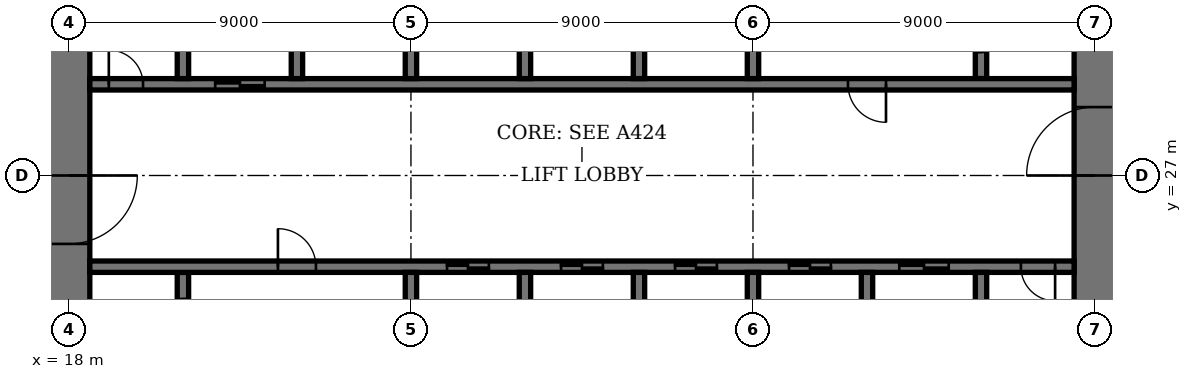
"""IFC4 building model, lengths in metres.
Left out: names, types, materials, properties, quantities, classifications, styles, units other than length and angle.
Written with IfcOpenShell. Run it as: python <this file> out.ifc"""

import sys

from ifc_helpers import new_model, si_unit, direction, frame, frame_2d, origin, place, context, subcontext, project, spatial, rectangle, extrude, element, fill, save


model = new_model("IFC4")
c1 = context("Model", 3, precision=1e-05, world=origin(), true_north=direction((0.0, 1.0)))
c2 = subcontext(c1, "Body", "Model", "MODEL_VIEW")
j1 = project(units=[si_unit("LENGTHUNIT", "METRE"), si_unit("PLANEANGLEUNIT", "RADIAN")], contexts=[c1])
p1 = place(None, origin())
s1 = spatial("IfcSite", under=j1, at=p1, CompositionType="ELEMENT")
p2 = place(p1, origin())
s2 = spatial("IfcBuilding", under=s1, at=p2, CompositionType="ELEMENT")
p3 = place(p2, frame((0.0, 0.0, 10.8)))
s3 = spatial("IfcBuildingStorey", under=s2, at=p3, CompositionType="ELEMENT", Elevation=10.8)
p4 = place(p3, frame((18.0, 35.45, 0.0), z_axis=(0.0, 0.0, 1.0), x_axis=(0.0, -1.0, 0.0)))
e1 = element("IfcWall", 1, at=p4, inside=s3, PredefinedType="SHEAR", context=c2, shape_type="SweptSolid", body=[
    extrude(rectangle(XDim=16.9, YDim=1.1, at=frame_2d((8.45, 0.0))), origin(), (0.0, 0.0, 1.0), 5.0),
])
p5 = place(p4, frame((8.45, 0.0, 0.0)))
e2 = element("IfcOpeningElement", 2, at=p5, cuts=e1, PredefinedType="OPENING", context=c2, shape_type="SweptSolid", body=[
    extrude(rectangle(XDim=1.8, YDim=2.4, at=frame_2d((0.9, 1.2))), frame((0.0, 0.56, 0.0), z_axis=(0.0, -1.0, 0.0), x_axis=(1.0, 0.0, 0.0)), (0.0, 0.0, 1.0), 1.12),
])
p6 = place(p3, frame((45.0, 18.55, 0.0), z_axis=(0.0, 0.0, 1.0), x_axis=(0.0, 1.0, 0.0)))
e3 = element("IfcWall", 3, at=p6, inside=s3, PredefinedType="SHEAR", context=c2, shape_type="SweptSolid", body=[
    extrude(rectangle(XDim=16.9, YDim=1.1, at=frame_2d((8.45, 0.0))), origin(), (0.0, 0.0, 1.0), 5.0),
])
p7 = place(p6, frame((8.45, 0.0, 0.0)))
e4 = element("IfcOpeningElement", 4, at=p7, cuts=e3, PredefinedType="OPENING", context=c2, shape_type="SweptSolid", body=[
    extrude(rectangle(XDim=1.8, YDim=2.4, at=frame_2d((0.9, 1.2))), frame((0.0, 0.56, 0.0), z_axis=(0.0, -1.0, 0.0), x_axis=(1.0, 0.0, 0.0)), (0.0, 0.0, 1.0), 1.12),
])
p8 = place(p3, frame((21.0, 21.95, 0.0), z_axis=(0.0, 0.0, 1.0), x_axis=(0.0, 1.0, 0.0)))
e5 = element("IfcWall", 5, at=p8, inside=s3, PredefinedType="SHEAR", context=c2, shape_type="SweptSolid", body=[
    extrude(rectangle(XDim=2.5, YDim=0.3, at=frame_2d((1.25, 0.0))), origin(), (0.0, 0.0, 1.0), 5.0),
])
p9 = place(p8, frame((0.7, 0.0, 0.0)))
e6 = element("IfcOpeningElement", 6, at=p9, cuts=e5, PredefinedType="OPENING", context=c2, shape_type="SweptSolid", body=[
    extrude(rectangle(XDim=1.1, YDim=2.4, at=frame_2d((0.55, 1.2))), frame((0.0, 0.16, 0.0), z_axis=(0.0, -1.0, 0.0), x_axis=(1.0, 0.0, 0.0)), (0.0, 0.0, 1.0), 0.32),
])
p10 = place(p3, frame((42.0, 29.55, 0.0), z_axis=(0.0, 0.0, 1.0), x_axis=(0.0, 1.0, 0.0)))
e7 = element("IfcWall", 7, at=p10, inside=s3, PredefinedType="SHEAR", context=c2, shape_type="SweptSolid", body=[
    extrude(rectangle(XDim=2.5, YDim=0.3, at=frame_2d((1.25, 0.0))), origin(), (0.0, 0.0, 1.0), 5.0),
])
p11 = place(p10, frame((0.7, 0.0, 0.0)))
e8 = element("IfcOpeningElement", 8, at=p11, cuts=e7, PredefinedType="OPENING", context=c2, shape_type="SweptSolid", body=[
    extrude(rectangle(XDim=1.1, YDim=2.4, at=frame_2d((0.55, 1.2))), frame((0.0, 0.16, 0.0), z_axis=(0.0, -1.0, 0.0), x_axis=(1.0, 0.0, 0.0)), (0.0, 0.0, 1.0), 0.32),
])
p12 = place(p3, frame((18.55, 24.6, 0.0), z_axis=(0.0, 0.0, 1.0), x_axis=(1.0, 0.0, 0.0)))
e9 = element("IfcWall", 9, at=p12, inside=s3, PredefinedType="SHEAR", context=c2, shape_type="SweptSolid", body=[
    extrude(rectangle(XDim=25.9, YDim=0.3, at=frame_2d((12.95, 0.0))), origin(), (0.0, 0.0, 1.0), 5.0),
])
p13 = place(p12, frame((4.95, 0.0, 0.0)))
e10 = element("IfcOpeningElement", 10, at=p13, cuts=e9, PredefinedType="OPENING", context=c2, shape_type="SweptSolid", body=[
    extrude(rectangle(XDim=1.0, YDim=2.4, at=frame_2d((0.5, 1.2))), frame((0.0, 0.16, 0.0), z_axis=(0.0, -1.0, 0.0), x_axis=(1.0, 0.0, 0.0)), (0.0, 0.0, 1.0), 0.32),
])
p14 = place(p12, frame((24.5, 0.0, 0.0)))
e11 = element("IfcOpeningElement", 11, at=p14, cuts=e9, PredefinedType="OPENING", context=c2, shape_type="SweptSolid", body=[
    extrude(rectangle(XDim=0.9, YDim=2.1, at=frame_2d((0.45, 1.05))), frame((0.0, 0.16, 0.0), z_axis=(0.0, -1.0, 0.0), x_axis=(1.0, 0.0, 0.0)), (0.0, 0.0, 1.0), 0.32),
])
p15 = place(p12, frame((9.4, 0.0, 0.0)))
e12 = element("IfcOpeningElement", 12, at=p15, cuts=e9, PredefinedType="OPENING", context=c2, shape_type="SweptSolid", body=[
    extrude(rectangle(XDim=1.1, YDim=2.4, at=frame_2d((0.55, 1.2))), frame((0.0, 0.16, 0.0), z_axis=(0.0, -1.0, 0.0), x_axis=(1.0, 0.0, 0.0)), (0.0, 0.0, 1.0), 0.32),
])
p16 = place(p12, frame((12.4, 0.0, 0.0)))
e13 = element("IfcOpeningElement", 13, at=p16, cuts=e9, PredefinedType="OPENING", context=c2, shape_type="SweptSolid", body=[
    extrude(rectangle(XDim=1.1, YDim=2.4, at=frame_2d((0.55, 1.2))), frame((0.0, 0.16, 0.0), z_axis=(0.0, -1.0, 0.0), x_axis=(1.0, 0.0, 0.0)), (0.0, 0.0, 1.0), 0.32),
])
p17 = place(p12, frame((15.4, 0.0, 0.0)))
e14 = element("IfcOpeningElement", 14, at=p17, cuts=e9, PredefinedType="OPENING", context=c2, shape_type="SweptSolid", body=[
    extrude(rectangle(XDim=1.1, YDim=2.4, at=frame_2d((0.55, 1.2))), frame((0.0, 0.16, 0.0), z_axis=(0.0, -1.0, 0.0), x_axis=(1.0, 0.0, 0.0)), (0.0, 0.0, 1.0), 0.32),
])
p18 = place(p12, frame((18.4, 0.0, 0.0)))
e15 = element("IfcOpeningElement", 15, at=p18, cuts=e9, PredefinedType="OPENING", context=c2, shape_type="SweptSolid", body=[
    extrude(rectangle(XDim=1.1, YDim=2.4, at=frame_2d((0.55, 1.2))), frame((0.0, 0.16, 0.0), z_axis=(0.0, -1.0, 0.0), x_axis=(1.0, 0.0, 0.0)), (0.0, 0.0, 1.0), 0.32),
])
p19 = place(p12, frame((21.3, 0.0, 0.0)))
e16 = element("IfcOpeningElement", 16, at=p19, cuts=e9, PredefinedType="OPENING", context=c2, shape_type="SweptSolid", body=[
    extrude(rectangle(XDim=1.3, YDim=2.4, at=frame_2d((0.65, 1.2))), frame((0.0, 0.16, 0.0), z_axis=(0.0, -1.0, 0.0), x_axis=(1.0, 0.0, 0.0)), (0.0, 0.0, 1.0), 0.32),
])
p20 = place(p3, frame((18.55, 29.4, 0.0), z_axis=(0.0, 0.0, 1.0), x_axis=(1.0, 0.0, 0.0)))
e17 = element("IfcWall", 17, at=p20, inside=s3, PredefinedType="SHEAR", context=c2, shape_type="SweptSolid", body=[
    extrude(rectangle(XDim=25.9, YDim=0.3, at=frame_2d((12.95, 0.0))), origin(), (0.0, 0.0, 1.0), 5.0),
])
p21 = place(p20, frame((19.95, 0.0, 0.0)))
e18 = element("IfcOpeningElement", 18, at=p21, cuts=e17, PredefinedType="OPENING", context=c2, shape_type="SweptSolid", body=[
    extrude(rectangle(XDim=1.0, YDim=2.4, at=frame_2d((0.5, 1.2))), frame((0.0, 0.16, 0.0), z_axis=(0.0, -1.0, 0.0), x_axis=(1.0, 0.0, 0.0)), (0.0, 0.0, 1.0), 0.32),
])
p22 = place(p20, frame((0.5, 0.0, 0.0)))
e19 = element("IfcOpeningElement", 19, at=p22, cuts=e17, PredefinedType="OPENING", context=c2, shape_type="SweptSolid", body=[
    extrude(rectangle(XDim=0.9, YDim=2.1, at=frame_2d((0.45, 1.05))), frame((0.0, 0.16, 0.0), z_axis=(0.0, -1.0, 0.0), x_axis=(1.0, 0.0, 0.0)), (0.0, 0.0, 1.0), 0.32),
])
p23 = place(p20, frame((3.3, 0.0, 0.0)))
e20 = element("IfcOpeningElement", 20, at=p23, cuts=e17, PredefinedType="OPENING", context=c2, shape_type="SweptSolid", body=[
    extrude(rectangle(XDim=1.3, YDim=2.4, at=frame_2d((0.65, 1.2))), frame((0.0, 0.16, 0.0), z_axis=(0.0, -1.0, 0.0), x_axis=(1.0, 0.0, 0.0)), (0.0, 0.0, 1.0), 0.32),
])
for number, where, z_axis, x_axis in (
    (21, (30.0, 21.75, 0.0), (0.0, 0.0, 1.0), (0.0, 1.0, 0.0)),
    (22, (33.0, 29.55, 0.0), (0.0, 0.0, 1.0), (0.0, 1.0, 0.0)),
    (23, (33.0, 21.75, 0.0), (0.0, 0.0, 1.0), (0.0, 1.0, 0.0)),
    (24, (30.0, 29.55, 0.0), (0.0, 0.0, 1.0), (0.0, 1.0, 0.0)),
    (25, (36.0, 21.75, 0.0), (0.0, 0.0, 1.0), (0.0, 1.0, 0.0)),
    (26, (27.0, 29.55, 0.0), (0.0, 0.0, 1.0), (0.0, 1.0, 0.0)),
):
    element("IfcWall", number, at=place(p3, frame(where, z_axis=z_axis, x_axis=x_axis)), inside=s3, PredefinedType="SHEAR", context=c2, shape_type="SweptSolid", body=[
        extrude(rectangle(XDim=2.7, YDim=0.3, at=frame_2d((1.35, 0.0))), origin(), (0.0, 0.0, 1.0), 5.0),
    ])
for number, where, z_axis, x_axis in (
    (27, (39.0, 18.55, 0.0), (0.0, 0.0, 1.0), (0.0, 1.0, 0.0)),
    (28, (24.0, 29.55, 0.0), (0.0, 0.0, 1.0), (0.0, 1.0, 0.0)),
):
    element("IfcWall", number, at=place(p3, frame(where, z_axis=z_axis, x_axis=x_axis)), inside=s3, PredefinedType="SHEAR", context=c2, shape_type="SweptSolid", body=[
        extrude(rectangle(XDim=5.9, YDim=0.3, at=frame_2d((2.95, 0.0))), origin(), (0.0, 0.0, 1.0), 5.0),
    ])
for number, where, z_axis, x_axis in (
    (29, (42.0, 21.75, 0.0), (0.0, 0.0, 1.0), (0.0, 1.0, 0.0)),
    (30, (21.0, 29.55, 0.0), (0.0, 0.0, 1.0), (0.0, 1.0, 0.0)),
):
    element("IfcWall", number, at=place(p3, frame(where, z_axis=z_axis, x_axis=x_axis)), inside=s3, PredefinedType="SHEAR", context=c2, shape_type="SweptSolid", body=[
        extrude(rectangle(XDim=2.7, YDim=0.3, at=frame_2d((1.35, 0.0))), origin(), (0.0, 0.0, 1.0), 5.0),
    ])
for number, where, z_axis, x_axis in (
    (31, (27.0, 21.6, 0.0), (0.0, 0.0, 1.0), (0.0, 1.0, 0.0)),
    (32, (36.0, 29.55, 0.0), (0.0, 0.0, 1.0), (0.0, 1.0, 0.0)),
):
    element("IfcWall", number, at=place(p3, frame(where, z_axis=z_axis, x_axis=x_axis)), inside=s3, PredefinedType="SHEAR", context=c2, shape_type="SweptSolid", body=[
        extrude(rectangle(XDim=2.85, YDim=0.3, at=frame_2d((1.425, 0.0))), origin(), (0.0, 0.0, 1.0), 5.0),
    ])
p24 = place(p5, origin())
e33 = element("IfcDoor", 33, at=p24, inside=s3, OperationType="DOUBLE_DOOR_DOUBLE_SWING", PredefinedType="DOOR", context=c2, shape_type="SweptSolid", body=[
    extrude(rectangle(XDim=1.8, YDim=2.4, at=frame_2d((0.9, 1.2))), frame((0.0, 0.03, 0.0), z_axis=(0.0, -1.0, 0.0), x_axis=(1.0, 0.0, 0.0)), (0.0, 0.0, 1.0), 0.06),
    extrude(rectangle(XDim=0.04, YDim=2.4, at=frame_2d((0.02, 1.2))), frame((0.0, 0.55, 0.0), z_axis=(0.0, -1.0, 0.0), x_axis=(1.0, 0.0, 0.0)), (0.0, 0.0, 1.0), 1.1),
    extrude(rectangle(XDim=0.04, YDim=2.4, at=frame_2d((1.78, 1.2))), frame((0.0, 0.55, 0.0), z_axis=(0.0, -1.0, 0.0), x_axis=(1.0, 0.0, 0.0)), (0.0, 0.0, 1.0), 1.1),
    extrude(rectangle(XDim=1.8, YDim=0.04, at=frame_2d((0.9, 2.38))), frame((0.0, 0.55, 0.0), z_axis=(0.0, -1.0, 0.0), x_axis=(1.0, 0.0, 0.0)), (0.0, 0.0, 1.0), 1.1),
])
fill(e2, e33)
p25 = place(p7, origin())
e34 = element("IfcDoor", 34, at=p25, inside=s3, OperationType="DOUBLE_DOOR_DOUBLE_SWING", PredefinedType="DOOR", context=c2, shape_type="SweptSolid", body=[
    extrude(rectangle(XDim=1.8, YDim=2.4, at=frame_2d((0.9, 1.2))), frame((0.0, 0.03, 0.0), z_axis=(0.0, -1.0, 0.0), x_axis=(1.0, 0.0, 0.0)), (0.0, 0.0, 1.0), 0.06),
    extrude(rectangle(XDim=0.04, YDim=2.4, at=frame_2d((0.02, 1.2))), frame((0.0, 0.55, 0.0), z_axis=(0.0, -1.0, 0.0), x_axis=(1.0, 0.0, 0.0)), (0.0, 0.0, 1.0), 1.1),
    extrude(rectangle(XDim=0.04, YDim=2.4, at=frame_2d((1.78, 1.2))), frame((0.0, 0.55, 0.0), z_axis=(0.0, -1.0, 0.0), x_axis=(1.0, 0.0, 0.0)), (0.0, 0.0, 1.0), 1.1),
    extrude(rectangle(XDim=1.8, YDim=0.04, at=frame_2d((0.9, 2.38))), frame((0.0, 0.55, 0.0), z_axis=(0.0, -1.0, 0.0), x_axis=(1.0, 0.0, 0.0)), (0.0, 0.0, 1.0), 1.1),
])
fill(e4, e34)
p26 = place(p13, origin())
e35 = element("IfcDoor", 35, at=p26, inside=s3, OperationType="SINGLE_SWING_RIGHT", PredefinedType="DOOR", context=c2, shape_type="SweptSolid", body=[
    extrude(rectangle(XDim=1.0, YDim=2.4, at=frame_2d((0.5, 1.2))), frame((0.0, 0.03, 0.0), z_axis=(0.0, -1.0, 0.0), x_axis=(1.0, 0.0, 0.0)), (0.0, 0.0, 1.0), 0.06),
])
fill(e10, e35)
p27 = place(p21, origin())
e36 = element("IfcDoor", 36, at=p27, inside=s3, OperationType="SINGLE_SWING_RIGHT", PredefinedType="DOOR", context=c2, shape_type="SweptSolid", body=[
    extrude(rectangle(XDim=1.0, YDim=2.4, at=frame_2d((0.5, 1.2))), frame((0.0, 0.03, 0.0), z_axis=(0.0, -1.0, 0.0), x_axis=(1.0, 0.0, 0.0)), (0.0, 0.0, 1.0), 0.06),
])
fill(e18, e36)
p28 = place(p14, origin())
e37 = element("IfcDoor", 37, at=p28, inside=s3, OperationType="SINGLE_SWING_RIGHT", PredefinedType="DOOR", context=c2, shape_type="SweptSolid", body=[
    extrude(rectangle(XDim=0.9, YDim=2.1, at=frame_2d((0.45, 1.05))), frame((0.0, 0.03, 0.0), z_axis=(0.0, -1.0, 0.0), x_axis=(1.0, 0.0, 0.0)), (0.0, 0.0, 1.0), 0.06),
])
fill(e11, e37)
p29 = place(p22, origin())
e38 = element("IfcDoor", 38, at=p29, inside=s3, OperationType="SINGLE_SWING_RIGHT", PredefinedType="DOOR", context=c2, shape_type="SweptSolid", body=[
    extrude(rectangle(XDim=0.9, YDim=2.1, at=frame_2d((0.45, 1.05))), frame((0.0, 0.03, 0.0), z_axis=(0.0, -1.0, 0.0), x_axis=(1.0, 0.0, 0.0)), (0.0, 0.0, 1.0), 0.06),
])
fill(e19, e38)
p30 = place(p15, origin())
e39 = element("IfcDoor", 39, at=p30, inside=s3, OperationType="DOUBLE_DOOR_SLIDING", PredefinedType="DOOR", context=c2, shape_type="SweptSolid", body=[
    extrude(rectangle(XDim=1.1, YDim=2.4, at=frame_2d((0.55, 1.2))), frame((0.0, 0.02, 0.0), z_axis=(0.0, -1.0, 0.0), x_axis=(1.0, 0.0, 0.0)), (0.0, 0.0, 1.0), 0.04),
])
fill(e12, e39)
p31 = place(p16, origin())
e40 = element("IfcDoor", 40, at=p31, inside=s3, OperationType="DOUBLE_DOOR_SLIDING", PredefinedType="DOOR", context=c2, shape_type="SweptSolid", body=[
    extrude(rectangle(XDim=1.1, YDim=2.4, at=frame_2d((0.55, 1.2))), frame((0.0, 0.02, 0.0), z_axis=(0.0, -1.0, 0.0), x_axis=(1.0, 0.0, 0.0)), (0.0, 0.0, 1.0), 0.04),
])
fill(e13, e40)
p32 = place(p17, origin())
e41 = element("IfcDoor", 41, at=p32, inside=s3, OperationType="DOUBLE_DOOR_SLIDING", PredefinedType="DOOR", context=c2, shape_type="SweptSolid", body=[
    extrude(rectangle(XDim=1.1, YDim=2.4, at=frame_2d((0.55, 1.2))), frame((0.0, 0.02, 0.0), z_axis=(0.0, -1.0, 0.0), x_axis=(1.0, 0.0, 0.0)), (0.0, 0.0, 1.0), 0.04),
])
fill(e14, e41)
p33 = place(p18, origin())
e42 = element("IfcDoor", 42, at=p33, inside=s3, OperationType="DOUBLE_DOOR_SLIDING", PredefinedType="DOOR", context=c2, shape_type="SweptSolid", body=[
    extrude(rectangle(XDim=1.1, YDim=2.4, at=frame_2d((0.55, 1.2))), frame((0.0, 0.02, 0.0), z_axis=(0.0, -1.0, 0.0), x_axis=(1.0, 0.0, 0.0)), (0.0, 0.0, 1.0), 0.04),
])
fill(e15, e42)
p34 = place(p19, origin())
e43 = element("IfcDoor", 43, at=p34, inside=s3, OperationType="DOUBLE_DOOR_SLIDING", PredefinedType="DOOR", context=c2, shape_type="SweptSolid", body=[
    extrude(rectangle(XDim=1.3, YDim=2.4, at=frame_2d((0.65, 1.2))), frame((0.0, 0.02, 0.0), z_axis=(0.0, -1.0, 0.0), x_axis=(1.0, 0.0, 0.0)), (0.0, 0.0, 1.0), 0.04),
])
fill(e16, e43)
p35 = place(p23, origin())
e44 = element("IfcDoor", 44, at=p35, inside=s3, OperationType="DOUBLE_DOOR_SLIDING", PredefinedType="DOOR", context=c2, shape_type="SweptSolid", body=[
    extrude(rectangle(XDim=1.3, YDim=2.4, at=frame_2d((0.65, 1.2))), frame((0.0, 0.02, 0.0), z_axis=(0.0, -1.0, 0.0), x_axis=(1.0, 0.0, 0.0)), (0.0, 0.0, 1.0), 0.04),
])
fill(e20, e44)
save(model, sys.argv[1])
